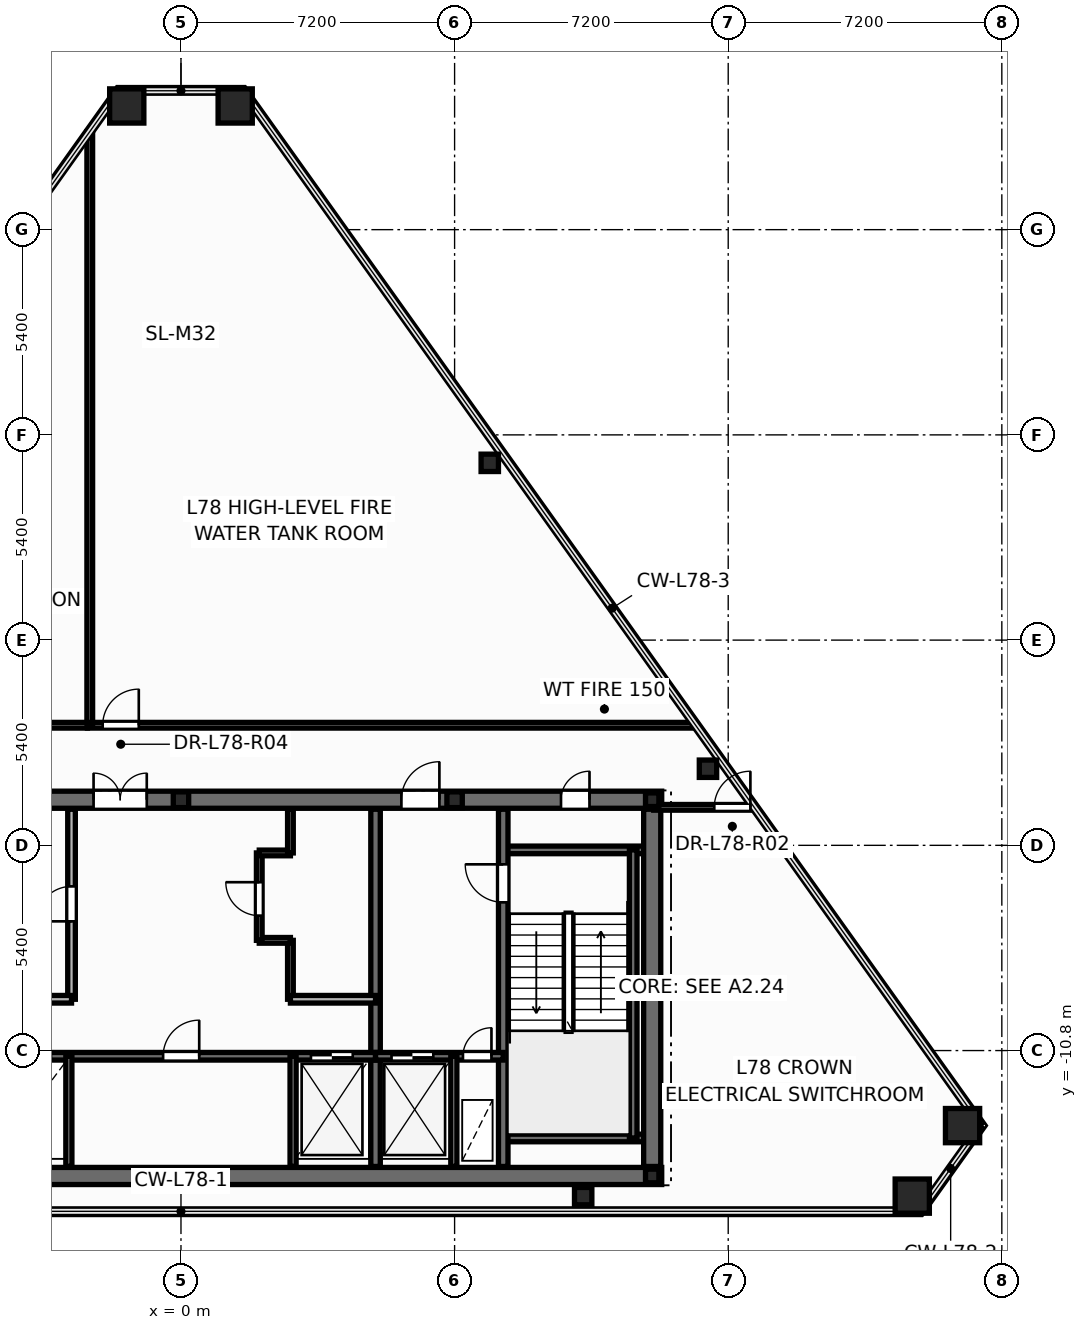
"""IFC4 building model, lengths in metres.
Left out: names, types, materials, properties, quantities, classifications, styles, units other than length and angle.
Written with IfcOpenShell. Run it as: python <this file> out.ifc"""

import sys

from ifc_helpers import new_model, si_unit, direction, frame, frame_2d, origin, origin_2d, place, context, subcontext, project, spatial, rectangle, hollow_rectangle, hollow_circle, i_section, extrude, element, fill, save


model = new_model("IFC4")
c1 = context("Model", 3, precision=1e-05, world=origin(), true_north=direction((0.0, 1.0)))
c2 = subcontext(c1, "Body", "Model", "MODEL_VIEW")
j1 = project(units=[si_unit("LENGTHUNIT", "METRE"), si_unit("PLANEANGLEUNIT", "RADIAN")], contexts=[c1])
p1 = place(None, origin())
s1 = spatial("IfcSite", under=j1, at=p1, CompositionType="ELEMENT")
p2 = place(p1, origin())
s2 = spatial("IfcBuilding", under=s1, at=p2, CompositionType="ELEMENT")
p3 = place(p2, frame((0.0, 0.0, 297.6)))
s3 = spatial("IfcBuildingStorey", under=s2, at=p3, CompositionType="ELEMENT", Elevation=297.6)
for number, where, z_axis, x_axis in (
    (1, (19.243, -14.63, 0.0), (0.0, 0.0, 1.0), (1.0, 0.0, 0.0)),
    (2, (20.567, -12.775, 0.0), (0.0, 0.0, 1.0), (1.0, 0.0, 0.0)),
    (3, (1.427, 14.055, 0.0), (0.0, 0.0, 1.0), (1.0, 0.0, 0.0)),
    (4, (-1.427, 14.055, 0.0), (0.0, 0.0, 1.0), (1.0, 0.0, 0.0)),
):
    element("IfcColumn", number, at=place(p3, frame(where, z_axis=z_axis, x_axis=x_axis)), inside=s3, PredefinedType="COLUMN", context=c2, shape_type="SweptSolid", body=[
        extrude(hollow_rectangle(XDim=0.9, YDim=0.9, WallThickness=0.04, at=origin_2d()), origin(), (0.0, 0.0, 1.0), 4.2),
    ])
for number, where, z_axis, x_axis in (
    (5, (10.583, -14.63, 0.0), (0.0, 0.0, 1.0), (1.0, 0.0, 0.0)),
    (6, (13.868, -3.385, 0.0), (0.0, 0.0, 1.0), (1.0, 0.0, 0.0)),
    (7, (8.126, 4.664, 0.0), (0.0, 0.0, 1.0), (1.0, 0.0, 0.0)),
):
    element("IfcColumn", number, at=place(p3, frame(where, z_axis=z_axis, x_axis=x_axis)), inside=s3, PredefinedType="COLUMN", context=c2, shape_type="SweptSolid", body=[
        extrude(hollow_circle(Radius=0.229, WallThickness=0.016, at=origin_2d()), origin(), (0.0, 0.0, 1.0), 4.2),
    ])
for number, where, z_axis, x_axis in (
    (8, (12.4, -14.1, 0.0), (0.0, 0.0, 1.0), (1.0, 0.0, 0.0)),
    (9, (12.4, -4.2, 0.0), (0.0, 0.0, 1.0), (1.0, 0.0, 0.0)),
):
    element("IfcColumn", number, at=place(p3, frame(where, z_axis=z_axis, x_axis=x_axis)), inside=s3, PredefinedType="COLUMN", context=c2, shape_type="SweptSolid", body=[
        extrude(i_section(OverallWidth=0.352, OverallDepth=0.359, WebThickness=0.018, FlangeThickness=0.026, at=origin_2d()), origin(), (0.0, 0.0, 1.0), 4.2),
    ])
for number, where, z_axis, x_axis in (
    (10, (0.0, -4.2, 0.0), (0.0, 0.0, 1.0), (1.0, 0.0, 0.0)),
    (11, (7.2, -4.2, 0.0), (0.0, 0.0, 1.0), (1.0, 0.0, 0.0)),
):
    element("IfcColumn", number, at=place(p3, frame(where, z_axis=z_axis, x_axis=x_axis)), inside=s3, PredefinedType="PILASTER", context=c2, shape_type="SweptSolid", body=[
        extrude(i_section(OverallWidth=0.405, OverallDepth=0.414, WebThickness=0.022, FlangeThickness=0.032, at=origin_2d()), origin(), (0.0, 0.0, 1.0), 4.2),
    ])
p4 = place(p3, frame((2.88, -9.45, 0.0), z_axis=(0.0, 0.0, 1.0), x_axis=(0.0, 1.0, 0.0)))
e12 = element("IfcWall", 12, at=p4, inside=s3, PredefinedType="PARTITIONING", context=c2, shape_type="SweptSolid", body=[
    extrude(rectangle(XDim=1.55, YDim=0.15, at=frame_2d((0.775, 0.0))), origin(), (0.0, 0.0, 1.0), 3.88),
])
p5 = place(p3, frame((2.06, -7.9, 0.0), z_axis=(0.0, 0.0, 1.0), x_axis=(1.0, 0.0, 0.0)))
e13 = element("IfcWall", 13, at=p5, inside=s3, PredefinedType="PARTITIONING", context=c2, shape_type="SweptSolid", body=[
    extrude(rectangle(XDim=0.82, YDim=0.15, at=frame_2d((0.41, 0.0))), origin(), (0.0, 0.0, 1.0), 3.88),
])
p6 = place(p3, frame((2.06, -7.9, 0.0), z_axis=(0.0, 0.0, 1.0), x_axis=(0.0, 1.0, 0.0)))
e14 = element("IfcWall", 14, at=p6, inside=s3, PredefinedType="PARTITIONING", context=c2, shape_type="SweptSolid", body=[
    extrude(rectangle(XDim=2.3, YDim=0.15, at=frame_2d((1.15, 0.0))), origin(), (0.0, 0.0, 1.0), 3.88),
])
p7 = place(p6, frame((0.65, 0.0, 0.0)))
e15 = element("IfcOpeningElement", 15, at=p7, cuts=e14, PredefinedType="OPENING", context=c2, shape_type="SweptSolid", body=[
    extrude(rectangle(XDim=0.886, YDim=2.104, at=frame_2d((0.44, 1.052))), frame((0.0, 0.085, 0.0), z_axis=(0.0, -1.0, 0.0), x_axis=(1.0, 0.0, 0.0)), (0.0, 0.0, 1.0), 0.17),
])
p8 = place(p3, frame((2.06, -5.6, 0.0), z_axis=(0.0, 0.0, 1.0), x_axis=(1.0, 0.0, 0.0)))
e16 = element("IfcWall", 16, at=p8, inside=s3, PredefinedType="PARTITIONING", context=c2, shape_type="SweptSolid", body=[
    extrude(rectangle(XDim=0.82, YDim=0.15, at=frame_2d((0.41, 0.0))), origin(), (0.0, 0.0, 1.0), 3.88),
])
p9 = place(p3, frame((2.88, -5.6, 0.0), z_axis=(0.0, 0.0, 1.0), x_axis=(0.0, 1.0, 0.0)))
e17 = element("IfcWall", 17, at=p9, inside=s3, PredefinedType="PARTITIONING", context=c2, shape_type="SweptSolid", body=[
    extrude(rectangle(XDim=1.15, YDim=0.15, at=frame_2d((0.575, 0.0))), origin(), (0.0, 0.0, 1.0), 3.88),
])
p10 = place(p3, frame((-12.65, -14.1, 0.0), z_axis=(0.0, 0.0, 1.0), x_axis=(1.0, 0.0, 0.0)))
e18 = element("IfcWall", 18, at=p10, inside=s3, PredefinedType="SHEAR", context=c2, shape_type="SweptSolid", body=[
    extrude(rectangle(XDim=25.3, YDim=0.45, at=frame_2d((12.65, 0.0))), origin(), (0.0, 0.0, 1.0), 4.2),
])
p11 = place(p3, frame((-12.65, -4.2, 0.0), z_axis=(0.0, 0.0, 1.0), x_axis=(1.0, 0.0, 0.0)))
e19 = element("IfcWall", 19, at=p11, inside=s3, PredefinedType="SHEAR", context=c2, shape_type="SweptSolid", body=[
    extrude(rectangle(XDim=25.3, YDim=0.45, at=frame_2d((12.65, 0.0))), origin(), (0.0, 0.0, 1.0), 4.2),
])
p12 = place(p11, frame((1.85, 0.0, 0.0)))
e20 = element("IfcOpeningElement", 20, at=p12, cuts=e19, PredefinedType="OPENING", context=c2, shape_type="SweptSolid", body=[
    extrude(rectangle(XDim=0.756, YDim=2.054, at=frame_2d((0.375, 1.027))), frame((0.0, 0.235, 0.0), z_axis=(0.0, -1.0, 0.0), x_axis=(1.0, 0.0, 0.0)), (0.0, 0.0, 1.0), 0.47),
])
p13 = place(p11, frame((22.65, 0.0, 0.0)))
e21 = element("IfcOpeningElement", 21, at=p13, cuts=e19, PredefinedType="OPENING", context=c2, shape_type="SweptSolid", body=[
    extrude(rectangle(XDim=0.756, YDim=2.054, at=frame_2d((0.375, 1.027))), frame((0.0, 0.235, 0.0), z_axis=(0.0, -1.0, 0.0), x_axis=(1.0, 0.0, 0.0)), (0.0, 0.0, 1.0), 0.47),
])
p14 = place(p11, frame((5.85, 0.0, 0.0)))
e22 = element("IfcOpeningElement", 22, at=p14, cuts=e19, PredefinedType="OPENING", context=c2, shape_type="SweptSolid", body=[
    extrude(rectangle(XDim=1.006, YDim=2.104, at=frame_2d((0.5, 1.052))), frame((0.0, 0.235, 0.0), z_axis=(0.0, -1.0, 0.0), x_axis=(1.0, 0.0, 0.0)), (0.0, 0.0, 1.0), 0.47),
])
p15 = place(p11, frame((10.35, 0.0, 0.0)))
e23 = element("IfcOpeningElement", 23, at=p15, cuts=e19, PredefinedType="OPENING", context=c2, shape_type="SweptSolid", body=[
    extrude(rectangle(XDim=1.406, YDim=2.154, at=frame_2d((0.7, 1.077))), frame((0.0, 0.235, 0.0), z_axis=(0.0, -1.0, 0.0), x_axis=(1.0, 0.0, 0.0)), (0.0, 0.0, 1.0), 0.47),
])
p16 = place(p11, frame((18.45, 0.0, 0.0)))
e24 = element("IfcOpeningElement", 24, at=p16, cuts=e19, PredefinedType="OPENING", context=c2, shape_type="SweptSolid", body=[
    extrude(rectangle(XDim=1.006, YDim=2.104, at=frame_2d((0.5, 1.052))), frame((0.0, 0.235, 0.0), z_axis=(0.0, -1.0, 0.0), x_axis=(1.0, 0.0, 0.0)), (0.0, 0.0, 1.0), 0.47),
])
for number, where, z_axis, x_axis in (
    (25, (8.48, -5.52, 0.0), (0.0, 0.0, 1.0), (1.0, 0.0, 0.0)),
    (26, (8.48, -13.1, 0.0), (0.0, 0.0, 1.0), (1.0, 0.0, 0.0)),
):
    element("IfcWall", number, at=place(p3, frame(where, z_axis=z_axis, x_axis=x_axis)), inside=s3, PredefinedType="SOLIDWALL", context=c2, shape_type="SweptSolid", body=[
        extrude(rectangle(XDim=3.87, YDim=0.2, at=frame_2d((1.935, 0.0))), origin(), (0.0, 0.0, 1.0), 4.2),
    ])
p17 = place(p3, frame((11.9, -13.1, 0.0), z_axis=(0.0, 0.0, 1.0), x_axis=(0.0, 1.0, 0.0)))
e27 = element("IfcWall", 27, at=p17, inside=s3, PredefinedType="SOLIDWALL", context=c2, shape_type="SweptSolid", body=[
    extrude(rectangle(XDim=7.58, YDim=0.2, at=frame_2d((3.79, 0.0))), origin(), (0.0, 0.0, 1.0), 4.2),
])
p18 = place(p3, frame((8.48, -13.85, 0.0), z_axis=(0.0, 0.0, 1.0), x_axis=(0.0, 1.0, 0.0)))
e28 = element("IfcWall", 28, at=p18, inside=s3, PredefinedType="SHEAR", context=c2, shape_type="SweptSolid", body=[
    extrude(rectangle(XDim=9.4, YDim=0.25, at=frame_2d((4.7, 0.0))), origin(), (0.0, 0.0, 1.0), 4.2),
])
p19 = place(p18, frame((6.95, 0.0, 0.0)))
e29 = element("IfcOpeningElement", 29, at=p19, cuts=e28, PredefinedType="OPENING", context=c2, shape_type="SweptSolid", body=[
    extrude(rectangle(XDim=1.006, YDim=2.104, at=frame_2d((0.5, 1.052))), frame((0.0, 0.135, 0.0), z_axis=(0.0, -1.0, 0.0), x_axis=(1.0, 0.0, 0.0)), (0.0, 0.0, 1.0), 0.27),
])
p20 = place(p3, frame((5.12, -13.85, 0.0), z_axis=(0.0, 0.0, 1.0), x_axis=(0.0, 1.0, 0.0)))
e30 = element("IfcWall", 30, at=p20, inside=s3, PredefinedType="SHEAR", context=c2, shape_type="SweptSolid", body=[
    extrude(rectangle(XDim=9.4, YDim=0.25, at=frame_2d((4.7, 0.0))), origin(), (0.0, 0.0, 1.0), 4.2),
])
p21 = place(p3, frame((-5.12, -10.95, 0.0), z_axis=(0.0, 0.0, 1.0), x_axis=(1.0, 0.0, 0.0)))
e31 = element("IfcWall", 31, at=p21, inside=s3, PredefinedType="SOLIDWALL", context=c2, shape_type="SweptSolid", body=[
    extrude(rectangle(XDim=10.24, YDim=0.2, at=frame_2d((5.12, 0.0))), origin(), (0.0, 0.0, 1.0), 4.2),
])
p22 = place(p21, frame((0.6, 0.0, 0.0)))
e32 = element("IfcOpeningElement", 32, at=p22, cuts=e31, PredefinedType="OPENING", context=c2, shape_type="SweptSolid", body=[
    extrude(rectangle(XDim=1.106, YDim=2.104, at=frame_2d((0.55, 1.052))), frame((0.0, 0.11, 0.0), z_axis=(0.0, -1.0, 0.0), x_axis=(1.0, 0.0, 0.0)), (0.0, 0.0, 1.0), 0.22),
])
p23 = place(p21, frame((4.65, 0.0, 0.0)))
e33 = element("IfcOpeningElement", 33, at=p23, cuts=e31, PredefinedType="OPENING", context=c2, shape_type="SweptSolid", body=[
    extrude(rectangle(XDim=0.956, YDim=2.104, at=frame_2d((0.475, 1.052))), frame((0.0, 0.11, 0.0), z_axis=(0.0, -1.0, 0.0), x_axis=(1.0, 0.0, 0.0)), (0.0, 0.0, 1.0), 0.22),
])
p24 = place(p21, frame((8.54, 0.0, 0.0)))
e34 = element("IfcOpeningElement", 34, at=p24, cuts=e31, PredefinedType="OPENING", context=c2, shape_type="SweptSolid", body=[
    extrude(rectangle(XDim=1.106, YDim=2.104, at=frame_2d((0.55, 1.052))), frame((0.0, 0.11, 0.0), z_axis=(0.0, -1.0, 0.0), x_axis=(1.0, 0.0, 0.0)), (0.0, 0.0, 1.0), 0.22),
])
p25 = place(p3, frame((5.12, -10.95, 0.0), z_axis=(0.0, 0.0, 1.0), x_axis=(1.0, 0.0, 0.0)))
e35 = element("IfcWall", 35, at=p25, inside=s3, PredefinedType="SOLIDWALL", context=c2, shape_type="SweptSolid", body=[
    extrude(rectangle(XDim=3.36, YDim=0.2, at=frame_2d((1.68, 0.0))), origin(), (0.0, 0.0, 1.0), 4.2),
])
p26 = place(p25, frame((0.42, 0.0, 0.0)))
e36 = element("IfcOpeningElement", 36, at=p26, cuts=e35, PredefinedType="OPENING", context=c2, shape_type="SweptSolid", body=[
    extrude(rectangle(XDim=1.106, YDim=2.104, at=frame_2d((0.55, 1.052))), frame((0.0, 0.11, 0.0), z_axis=(0.0, -1.0, 0.0), x_axis=(1.0, 0.0, 0.0)), (0.0, 0.0, 1.0), 0.22),
])
p27 = place(p25, frame((2.3, 0.0, 0.0)))
e37 = element("IfcOpeningElement", 37, at=p27, cuts=e35, PredefinedType="OPENING", context=c2, shape_type="SweptSolid", body=[
    extrude(rectangle(XDim=0.756, YDim=2.054, at=frame_2d((0.375, 1.027))), frame((0.0, 0.11, 0.0), z_axis=(0.0, -1.0, 0.0), x_axis=(1.0, 0.0, 0.0)), (0.0, 0.0, 1.0), 0.22),
])
for number, where, z_axis, x_axis in (
    (38, (7.18, -13.85, 0.0), (0.0, 0.0, 1.0), (0.0, 1.0, 0.0)),
    (39, (-2.95, -13.85, 0.0), (0.0, 0.0, 1.0), (0.0, 1.0, 0.0)),
    (40, (2.95, -13.85, 0.0), (0.0, 0.0, 1.0), (0.0, 1.0, 0.0)),
):
    element("IfcWall", number, at=place(p3, frame(where, z_axis=z_axis, x_axis=x_axis)), inside=s3, PredefinedType="PARTITIONING", context=c2, shape_type="SweptSolid", body=[
        extrude(rectangle(XDim=2.9, YDim=0.16, at=frame_2d((1.45, 0.0))), origin(), (0.0, 0.0, 1.0), 3.105),
    ])
p28 = place(p3, frame((12.4, -13.85, 0.0), z_axis=(0.0, 0.0, 1.0), x_axis=(0.0, 1.0, 0.0)))
e41 = element("IfcWall", 41, at=p28, inside=s3, PredefinedType="SHEAR", context=c2, shape_type="SweptSolid", body=[
    extrude(rectangle(XDim=9.4, YDim=0.45, at=frame_2d((4.7, 0.0))), origin(), (0.0, 0.0, 1.0), 4.2),
])
p29 = place(p3, frame((-2.88, -9.45, 0.0), z_axis=(0.0, 0.0, 1.0), x_axis=(0.0, 1.0, 0.0)))
e42 = element("IfcWall", 42, at=p29, inside=s3, PredefinedType="SOLIDWALL", context=c2, shape_type="SweptSolid", body=[
    extrude(rectangle(XDim=5.0, YDim=0.2, at=frame_2d((2.5, 0.0))), origin(), (0.0, 0.0, 1.0), 3.88),
])
p30 = place(p29, frame((2.05, 0.0, 0.0)))
e43 = element("IfcOpeningElement", 43, at=p30, cuts=e42, PredefinedType="OPENING", context=c2, shape_type="SweptSolid", body=[
    extrude(rectangle(XDim=0.926, YDim=2.104, at=frame_2d((0.46, 1.052))), frame((0.0, 0.11, 0.0), z_axis=(0.0, -1.0, 0.0), x_axis=(1.0, 0.0, 0.0)), (0.0, 0.0, 1.0), 0.22),
])
for number, where, z_axis, x_axis in (
    (44, (-5.12, -9.45, 0.0), (0.0, 0.0, 1.0), (1.0, 0.0, 0.0)),
    (45, (2.88, -9.45, 0.0), (0.0, 0.0, 1.0), (1.0, 0.0, 0.0)),
):
    element("IfcWall", number, at=place(p3, frame(where, z_axis=z_axis, x_axis=x_axis)), inside=s3, PredefinedType="SOLIDWALL", context=c2, shape_type="SweptSolid", body=[
        extrude(rectangle(XDim=2.24, YDim=0.2, at=frame_2d((1.12, 0.0))), origin(), (0.0, 0.0, 1.0), 3.88),
    ])
p31 = place(p3, frame((-2.46, -2.24, 0.0), z_axis=(0.0, 0.0, 1.0), x_axis=(1.0, 0.0, 0.0)))
e46 = element("IfcWall", 46, at=p31, inside=s3, PredefinedType="PARTITIONING", context=c2, shape_type="SweptSolid", body=[
    extrude(rectangle(XDim=16.003, YDim=0.15, at=frame_2d((8.001, 0.0))), origin(), (0.0, 0.0, 1.0), 2.855),
])
p32 = place(p31, frame((0.4, 0.0, 0.0)))
e47 = element("IfcOpeningElement", 47, at=p32, cuts=e46, PredefinedType="OPENING", context=c2, shape_type="SweptSolid", body=[
    extrude(rectangle(XDim=0.956, YDim=2.104, at=frame_2d((0.475, 1.052))), frame((0.0, 0.085, 0.0), z_axis=(0.0, -1.0, 0.0), x_axis=(1.0, 0.0, 0.0)), (0.0, 0.0, 1.0), 0.17),
])
p33 = place(p3, frame((-2.4, -2.24, 0.0), z_axis=(0.0, 0.0, 1.0), x_axis=(0.0, 1.0, 0.0)))
e48 = element("IfcWall", 48, at=p33, inside=s3, PredefinedType="PARTITIONING", context=c2, shape_type="SweptSolid", body=[
    extrude(rectangle(XDim=15.619, YDim=0.15, at=frame_2d((7.81, 0.0))), origin(), (0.0, 0.0, 1.0), 2.855),
])
p34 = place(p3, frame((-13.543, -2.24, 0.0), z_axis=(0.0, 0.0, 1.0), x_axis=(1.0, 0.0, 0.0)))
e49 = element("IfcWall", 49, at=p34, inside=s3, PredefinedType="PARTITIONING", context=c2, shape_type="SweptSolid", body=[
    extrude(rectangle(XDim=11.081, YDim=0.15, at=frame_2d((5.541, 0.0))), origin(), (0.0, 0.0, 1.0), 2.855),
])
p35 = place(p34, frame((2.178, 0.0, 0.0)))
e50 = element("IfcOpeningElement", 50, at=p35, cuts=e49, PredefinedType="OPENING", context=c2, shape_type="SweptSolid", body=[
    extrude(rectangle(XDim=0.956, YDim=2.104, at=frame_2d((0.475, 1.052))), frame((0.0, 0.085, 0.0), z_axis=(0.0, -1.0, 0.0), x_axis=(1.0, 0.0, 0.0)), (0.0, 0.0, 1.0), 0.17),
])
p36 = place(p3, frame((12.44, -4.4, 0.0), z_axis=(0.0, 0.0, 1.0), x_axis=(1.0, 0.0, 0.0)))
e51 = element("IfcWall", 51, at=p36, inside=s3, PredefinedType="PARTITIONING", context=c2, shape_type="SweptSolid", body=[
    extrude(rectangle(XDim=2.644, YDim=0.15, at=frame_2d((1.322, 0.0))), origin(), (0.0, 0.0, 1.0), 2.855),
])
p37 = place(p36, frame((1.594, 0.0, 0.0)))
e52 = element("IfcOpeningElement", 52, at=p37, cuts=e51, PredefinedType="OPENING", context=c2, shape_type="SweptSolid", body=[
    extrude(rectangle(XDim=0.956, YDim=2.104, at=frame_2d((0.475, 1.052))), frame((0.0, 0.085, 0.0), z_axis=(0.0, -1.0, 0.0), x_axis=(1.0, 0.0, 0.0)), (0.0, 0.0, 1.0), 0.17),
])
p38 = place(p30, origin())
e53 = element("IfcDoor", 53, at=p38, inside=s3, OperationType="SINGLE_SWING_LEFT", PredefinedType="DOOR", context=c2, shape_type="SweptSolid", body=[
    extrude(rectangle(XDim=0.92, YDim=2.1, at=frame_2d((0.46, 1.05))), frame((0.0, 0.025, 0.0), z_axis=(0.0, -1.0, 0.0), x_axis=(1.0, 0.0, 0.0)), (0.0, 0.0, 1.0), 0.05),
])
fill(e43, e53)
p39 = place(p7, origin())
e54 = element("IfcDoor", 54, at=p39, inside=s3, OperationType="SINGLE_SWING_RIGHT", PredefinedType="DOOR", context=c2, shape_type="SweptSolid", body=[
    extrude(rectangle(XDim=0.88, YDim=2.1, at=frame_2d((0.44, 1.05))), frame((0.0, 0.025, 0.0), z_axis=(0.0, -1.0, 0.0), x_axis=(1.0, 0.0, 0.0)), (0.0, 0.0, 1.0), 0.05),
])
fill(e15, e54)
p40 = place(p19, origin())
e55 = element("IfcDoor", 55, at=p40, inside=s3, OperationType="SINGLE_SWING_RIGHT", PredefinedType="DOOR", context=c2, shape_type="SweptSolid", body=[
    extrude(rectangle(XDim=1.0, YDim=2.1, at=frame_2d((0.5, 1.05))), frame((0.0, 0.025, 0.0), z_axis=(0.0, -1.0, 0.0), x_axis=(1.0, 0.0, 0.0)), (0.0, 0.0, 1.0), 0.05),
])
fill(e29, e55)
p41 = place(p26, origin())
e56 = element("IfcDoor", 56, at=p41, inside=s3, OperationType="DOUBLE_DOOR_SLIDING", PredefinedType="DOOR", context=c2, shape_type="SweptSolid", body=[
    extrude(rectangle(XDim=1.1, YDim=2.1, at=frame_2d((0.55, 1.05))), frame((0.0, 0.025, 0.0), z_axis=(0.0, -1.0, 0.0), x_axis=(1.0, 0.0, 0.0)), (0.0, 0.0, 1.0), 0.05),
])
fill(e36, e56)
p42 = place(p27, origin())
e57 = element("IfcDoor", 57, at=p42, inside=s3, OperationType="SINGLE_SWING_RIGHT", PredefinedType="DOOR", context=c2, shape_type="SweptSolid", body=[
    extrude(rectangle(XDim=0.75, YDim=2.05, at=frame_2d((0.375, 1.025))), frame((0.0, 0.025, 0.0), z_axis=(0.0, -1.0, 0.0), x_axis=(1.0, 0.0, 0.0)), (0.0, 0.0, 1.0), 0.05),
])
fill(e37, e57)
p43 = place(p23, origin())
e58 = element("IfcDoor", 58, at=p43, inside=s3, OperationType="SINGLE_SWING_RIGHT", PredefinedType="DOOR", context=c2, shape_type="SweptSolid", body=[
    extrude(rectangle(XDim=0.95, YDim=2.1, at=frame_2d((0.475, 1.05))), frame((0.0, 0.025, 0.0), z_axis=(0.0, -1.0, 0.0), x_axis=(1.0, 0.0, 0.0)), (0.0, 0.0, 1.0), 0.05),
])
fill(e33, e58)
p44 = place(p24, origin())
e59 = element("IfcDoor", 59, at=p44, inside=s3, OperationType="DOUBLE_DOOR_SLIDING", PredefinedType="DOOR", context=c2, shape_type="SweptSolid", body=[
    extrude(rectangle(XDim=1.1, YDim=2.1, at=frame_2d((0.55, 1.05))), frame((0.0, 0.025, 0.0), z_axis=(0.0, -1.0, 0.0), x_axis=(1.0, 0.0, 0.0)), (0.0, 0.0, 1.0), 0.05),
])
fill(e34, e59)
p45 = place(p13, origin())
e60 = element("IfcDoor", 60, at=p45, inside=s3, OperationType="SINGLE_SWING_RIGHT", PredefinedType="DOOR", context=c2, shape_type="SweptSolid", body=[
    extrude(rectangle(XDim=0.75, YDim=2.05, at=frame_2d((0.375, 1.025))), frame((0.0, 0.025, 0.0), z_axis=(0.0, -1.0, 0.0), x_axis=(1.0, 0.0, 0.0)), (0.0, 0.0, 1.0), 0.05),
])
fill(e21, e60)
p46 = place(p15, origin())
e61 = element("IfcDoor", 61, at=p46, inside=s3, OperationType="DOUBLE_DOOR_SINGLE_SWING", PredefinedType="DOOR", context=c2, shape_type="SweptSolid", body=[
    extrude(rectangle(XDim=1.4, YDim=2.15, at=frame_2d((0.7, 1.075))), frame((0.0, 0.025, 0.0), z_axis=(0.0, -1.0, 0.0), x_axis=(1.0, 0.0, 0.0)), (0.0, 0.0, 1.0), 0.05),
])
fill(e23, e61)
p47 = place(p16, origin())
e62 = element("IfcDoor", 62, at=p47, inside=s3, OperationType="SINGLE_SWING_RIGHT", PredefinedType="DOOR", context=c2, shape_type="SweptSolid", body=[
    extrude(rectangle(XDim=1.0, YDim=2.1, at=frame_2d((0.5, 1.05))), frame((0.0, 0.025, 0.0), z_axis=(0.0, -1.0, 0.0), x_axis=(1.0, 0.0, 0.0)), (0.0, 0.0, 1.0), 0.05),
])
fill(e24, e62)
p48 = place(p37, origin())
e63 = element("IfcDoor", 63, at=p48, inside=s3, OperationType="SINGLE_SWING_RIGHT", PredefinedType="DOOR", context=c2, shape_type="SweptSolid", body=[
    extrude(rectangle(XDim=0.95, YDim=2.1, at=frame_2d((0.475, 1.05))), frame((0.0, 0.025, 0.0), z_axis=(0.0, -1.0, 0.0), x_axis=(1.0, 0.0, 0.0)), (0.0, 0.0, 1.0), 0.05),
])
fill(e52, e63)
p49 = place(p32, origin())
e64 = element("IfcDoor", 64, at=p49, inside=s3, OperationType="SINGLE_SWING_RIGHT", PredefinedType="DOOR", context=c2, shape_type="SweptSolid", body=[
    extrude(rectangle(XDim=0.95, YDim=2.1, at=frame_2d((0.475, 1.05))), frame((0.0, 0.025, 0.0), z_axis=(0.0, -1.0, 0.0), x_axis=(1.0, 0.0, 0.0)), (0.0, 0.0, 1.0), 0.05),
])
fill(e47, e64)
save(model, sys.argv[1])
